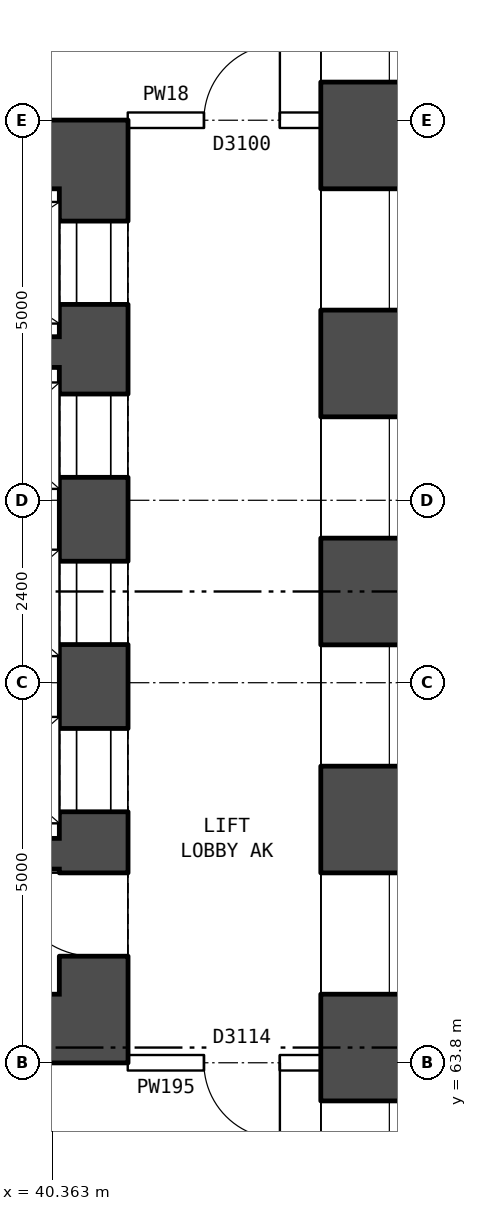
"""IFC4 building model, lengths in metres.
Left out: names, types, materials, properties, quantities, classifications, styles, units other than length and angle.
Written with IfcOpenShell. Run it as: python <this file> out.ifc"""

import sys

from ifc_helpers import new_model, si_unit, direction, frame, frame_2d, origin, place, context, subcontext, project, spatial, rectangle, extrude, element, fill, save


model = new_model("IFC4")
c1 = context("Model", 3, precision=1e-05, world=origin(), true_north=direction((0.0, 1.0)))
c2 = subcontext(c1, "Body", "Model", "MODEL_VIEW")
j1 = project(units=[si_unit("LENGTHUNIT", "METRE"), si_unit("PLANEANGLEUNIT", "RADIAN")], contexts=[c1])
p1 = place(None, origin())
s1 = spatial("IfcSite", under=j1, at=p1, CompositionType="ELEMENT")
p2 = place(p1, origin())
s2 = spatial("IfcBuilding", under=s1, at=p2, CompositionType="ELEMENT")
p3 = place(p2, frame((0.0, 0.0, 5.5)))
s3 = spatial("IfcBuildingStorey", under=s2, at=p3, CompositionType="ELEMENT", Elevation=5.5)
p4 = place(p3, frame((44.5, 56.4, -0.3), z_axis=(0.0, 0.0, 1.0), x_axis=(0.0, 1.0, 0.0)))
e1 = element("IfcWall", 1, at=p4, inside=s3, PredefinedType="SHEAR", context=c2, shape_type="SweptSolid", body=[
    extrude(rectangle(XDim=27.2, YDim=1.2, at=frame_2d((13.6, 0.0))), origin(), (0.0, 0.0, 1.0), 4.6),
])
p5 = place(p4, frame((2.3, 0.0, 0.8)))
e2 = element("IfcOpeningElement", 2, at=p5, cuts=e1, PredefinedType="OPENING", context=c2, shape_type="SweptSolid", body=[
    extrude(rectangle(XDim=1.6, YDim=1.8, at=frame_2d((0.8, 0.9))), frame((0.0, 0.61, 0.0), z_axis=(0.0, -1.0, 0.0), x_axis=(1.0, 0.0, 0.0)), (0.0, 0.0, 1.0), 1.22),
])
p6 = place(p4, frame((5.3, 0.0, 0.8)))
e3 = element("IfcOpeningElement", 3, at=p6, cuts=e1, PredefinedType="OPENING", context=c2, shape_type="SweptSolid", body=[
    extrude(rectangle(XDim=1.6, YDim=1.8, at=frame_2d((0.8, 0.9))), frame((0.0, 0.61, 0.0), z_axis=(0.0, -1.0, 0.0), x_axis=(1.0, 0.0, 0.0)), (0.0, 0.0, 1.0), 1.22),
])
p7 = place(p4, frame((8.3, 0.0, 0.8)))
e4 = element("IfcOpeningElement", 4, at=p7, cuts=e1, PredefinedType="OPENING", context=c2, shape_type="SweptSolid", body=[
    extrude(rectangle(XDim=1.6, YDim=1.8, at=frame_2d((0.8, 0.9))), frame((0.0, 0.61, 0.0), z_axis=(0.0, -1.0, 0.0), x_axis=(1.0, 0.0, 0.0)), (0.0, 0.0, 1.0), 1.22),
])
p8 = place(p4, frame((11.3, 0.0, 0.8)))
e5 = element("IfcOpeningElement", 5, at=p8, cuts=e1, PredefinedType="OPENING", context=c2, shape_type="SweptSolid", body=[
    extrude(rectangle(XDim=1.6, YDim=1.8, at=frame_2d((0.8, 0.9))), frame((0.0, 0.61, 0.0), z_axis=(0.0, -1.0, 0.0), x_axis=(1.0, 0.0, 0.0)), (0.0, 0.0, 1.0), 1.22),
])
p9 = place(p4, frame((14.3, 0.0, 0.8)))
e6 = element("IfcOpeningElement", 6, at=p9, cuts=e1, PredefinedType="OPENING", context=c2, shape_type="SweptSolid", body=[
    extrude(rectangle(XDim=1.6, YDim=1.8, at=frame_2d((0.8, 0.9))), frame((0.0, 0.61, 0.0), z_axis=(0.0, -1.0, 0.0), x_axis=(1.0, 0.0, 0.0)), (0.0, 0.0, 1.0), 1.22),
])
p10 = place(p4, frame((17.3, 0.0, 0.8)))
e7 = element("IfcOpeningElement", 7, at=p10, cuts=e1, PredefinedType="OPENING", context=c2, shape_type="SweptSolid", body=[
    extrude(rectangle(XDim=1.6, YDim=1.8, at=frame_2d((0.8, 0.9))), frame((0.0, 0.61, 0.0), z_axis=(0.0, -1.0, 0.0), x_axis=(1.0, 0.0, 0.0)), (0.0, 0.0, 1.0), 1.22),
])
p11 = place(p4, frame((20.3, 0.0, 0.8)))
e8 = element("IfcOpeningElement", 8, at=p11, cuts=e1, PredefinedType="OPENING", context=c2, shape_type="SweptSolid", body=[
    extrude(rectangle(XDim=1.6, YDim=1.8, at=frame_2d((0.8, 0.9))), frame((0.0, 0.61, 0.0), z_axis=(0.0, -1.0, 0.0), x_axis=(1.0, 0.0, 0.0)), (0.0, 0.0, 1.0), 1.22),
])
p12 = place(p4, frame((23.3, 0.0, 0.8)))
e9 = element("IfcOpeningElement", 9, at=p12, cuts=e1, PredefinedType="OPENING", context=c2, shape_type="SweptSolid", body=[
    extrude(rectangle(XDim=1.6, YDim=1.8, at=frame_2d((0.8, 0.9))), frame((0.0, 0.61, 0.0), z_axis=(0.0, -1.0, 0.0), x_axis=(1.0, 0.0, 0.0)), (0.0, 0.0, 1.0), 1.22),
])
p13 = place(p3, frame((40.91, 75.3, 0.0), z_axis=(0.0, 0.0, 1.0), x_axis=(0.0, -1.0, 0.0)))
e10 = element("IfcWall", 10, at=p13, inside=s3, PredefinedType="SHEAR", context=c2, shape_type="SweptSolid", body=[
    extrude(rectangle(XDim=10.6, YDim=0.9, at=frame_2d((5.3, 0.0))), origin(), (0.0, 0.0, 1.0), 4.3),
])
p14 = place(p13, frame((0.425, 0.0, 0.0)))
e11 = element("IfcOpeningElement", 11, at=p14, cuts=e10, PredefinedType="OPENING", context=c2, shape_type="SweptSolid", body=[
    extrude(rectangle(XDim=1.1, YDim=2.1, at=frame_2d((0.55, 1.05))), frame((0.0, 0.46, 0.0), z_axis=(0.0, -1.0, 0.0), x_axis=(1.0, 0.0, 0.0)), (0.0, 0.0, 1.0), 0.92),
])
p15 = place(p13, frame((2.7, 0.0, 0.0)))
e12 = element("IfcOpeningElement", 12, at=p15, cuts=e10, PredefinedType="OPENING", context=c2, shape_type="SweptSolid", body=[
    extrude(rectangle(XDim=1.1, YDim=2.1, at=frame_2d((0.55, 1.05))), frame((0.0, 0.46, 0.0), z_axis=(0.0, -1.0, 0.0), x_axis=(1.0, 0.0, 0.0)), (0.0, 0.0, 1.0), 0.92),
])
p16 = place(p13, frame((4.9, 0.0, 0.0)))
e13 = element("IfcOpeningElement", 13, at=p16, cuts=e10, PredefinedType="OPENING", context=c2, shape_type="SweptSolid", body=[
    extrude(rectangle(XDim=1.1, YDim=2.1, at=frame_2d((0.55, 1.05))), frame((0.0, 0.46, 0.0), z_axis=(0.0, -1.0, 0.0), x_axis=(1.0, 0.0, 0.0)), (0.0, 0.0, 1.0), 0.92),
])
p17 = place(p13, frame((7.1, 0.0, 0.0)))
e14 = element("IfcOpeningElement", 14, at=p17, cuts=e10, PredefinedType="OPENING", context=c2, shape_type="SweptSolid", body=[
    extrude(rectangle(XDim=1.1, YDim=2.1, at=frame_2d((0.55, 1.05))), frame((0.0, 0.46, 0.0), z_axis=(0.0, -1.0, 0.0), x_axis=(1.0, 0.0, 0.0)), (0.0, 0.0, 1.0), 0.92),
])
p18 = place(p13, frame((9.0, 0.0, 0.0)))
e15 = element("IfcOpeningElement", 15, at=p18, cuts=e10, PredefinedType="OPENING", context=c2, shape_type="SweptSolid", body=[
    extrude(rectangle(XDim=1.1, YDim=2.1, at=frame_2d((0.55, 1.05))), frame((0.0, 0.46, 0.0), z_axis=(0.0, -1.0, 0.0), x_axis=(1.0, 0.0, 0.0)), (0.0, 0.0, 1.0), 0.92),
])
for number, where, z_axis, x_axis in (
    (16, (41.36, 75.75, 0.0), (0.0, 0.0, 1.0), (-1.0, 0.0, 0.0)),
    (17, (41.36, 64.25, 0.0), (0.0, 0.0, 1.0), (-1.0, 0.0, 0.0)),
):
    element("IfcWall", number, at=place(p3, frame(where, z_axis=z_axis, x_axis=x_axis)), inside=s3, PredefinedType="SHEAR", context=c2, shape_type="SweptSolid", body=[
        extrude(rectangle(XDim=9.0, YDim=0.9, at=frame_2d((4.5, 0.0))), origin(), (0.0, 0.0, 1.0), 4.3),
    ])
p19 = place(p3, frame((40.46, 73.15, 0.0), z_axis=(0.0, 0.0, 1.0), x_axis=(-1.0, 0.0, 0.0)))
e18 = element("IfcWall", 18, at=p19, inside=s3, PredefinedType="SHEAR", context=c2, shape_type="SweptSolid", body=[
    extrude(rectangle(XDim=3.17, YDim=0.4, at=frame_2d((1.585, 0.0))), origin(), (0.0, 0.0, 1.0), 4.3),
])
p20 = place(p3, frame((40.46, 66.55, 0.0), z_axis=(0.0, 0.0, 1.0), x_axis=(-1.0, 0.0, 0.0)))
e19 = element("IfcWall", 19, at=p20, inside=s3, PredefinedType="SHEAR", context=c2, shape_type="SweptSolid", body=[
    extrude(rectangle(XDim=1.95, YDim=0.4, at=frame_2d((0.975, 0.0))), origin(), (0.0, 0.0, 1.0), 4.3),
])
p21 = place(p3, frame((41.36, 63.8, 0.0), z_axis=(0.0, 0.0, 1.0), x_axis=(1.0, 0.0, 0.0)))
e20 = element("IfcWall", 20, at=p21, inside=s3, PredefinedType="PARTITIONING", context=c2, shape_type="SweptSolid", body=[
    extrude(rectangle(XDim=2.54, YDim=0.2, at=frame_2d((1.27, 0.0))), origin(), (0.0, 0.0, 1.0), 4.3),
])
p22 = place(p21, frame((1.0, 0.0, 0.0)))
e21 = element("IfcOpeningElement", 21, at=p22, cuts=e20, PredefinedType="OPENING", context=c2, shape_type="SweptSolid", body=[
    extrude(rectangle(XDim=1.0, YDim=2.1, at=frame_2d((0.5, 1.05))), frame((0.0, 0.11, 0.0), z_axis=(0.0, -1.0, 0.0), x_axis=(1.0, 0.0, 0.0)), (0.0, 0.0, 1.0), 0.22),
])
p23 = place(p3, frame((41.36, 76.2, 0.0), z_axis=(0.0, 0.0, 1.0), x_axis=(1.0, 0.0, 0.0)))
e22 = element("IfcWall", 22, at=p23, inside=s3, PredefinedType="PARTITIONING", context=c2, shape_type="SweptSolid", body=[
    extrude(rectangle(XDim=2.54, YDim=0.2, at=frame_2d((1.27, 0.0))), origin(), (0.0, 0.0, 1.0), 4.3),
])
p24 = place(p23, frame((1.0, 0.0, 0.0)))
e23 = element("IfcOpeningElement", 23, at=p24, cuts=e22, PredefinedType="OPENING", context=c2, shape_type="SweptSolid", body=[
    extrude(rectangle(XDim=1.0, YDim=2.1, at=frame_2d((0.5, 1.05))), frame((0.0, 0.11, 0.0), z_axis=(0.0, -1.0, 0.0), x_axis=(1.0, 0.0, 0.0)), (0.0, 0.0, 1.0), 0.22),
])
p25 = place(p6, origin())
e24 = element("IfcWindow", 24, at=p25, inside=s3, PartitioningType="SINGLE_PANEL", PredefinedType="WINDOW", context=c2, shape_type="SweptSolid", body=[
    extrude(rectangle(XDim=1.6, YDim=1.8, at=frame_2d((0.8, 0.9))), frame((0.0, -0.27, 0.0), z_axis=(0.0, -1.0, 0.0), x_axis=(1.0, 0.0, 0.0)), (0.0, 0.0, 1.0), 0.06),
])
fill(e3, e24)
p26 = place(p7, origin())
e25 = element("IfcWindow", 25, at=p26, inside=s3, PartitioningType="SINGLE_PANEL", PredefinedType="WINDOW", context=c2, shape_type="SweptSolid", body=[
    extrude(rectangle(XDim=1.6, YDim=1.8, at=frame_2d((0.8, 0.9))), frame((0.0, -0.27, 0.0), z_axis=(0.0, -1.0, 0.0), x_axis=(1.0, 0.0, 0.0)), (0.0, 0.0, 1.0), 0.06),
])
fill(e4, e25)
p27 = place(p8, origin())
e26 = element("IfcWindow", 26, at=p27, inside=s3, PartitioningType="SINGLE_PANEL", PredefinedType="WINDOW", context=c2, shape_type="SweptSolid", body=[
    extrude(rectangle(XDim=1.6, YDim=1.8, at=frame_2d((0.8, 0.9))), frame((0.0, -0.27, 0.0), z_axis=(0.0, -1.0, 0.0), x_axis=(1.0, 0.0, 0.0)), (0.0, 0.0, 1.0), 0.06),
])
fill(e5, e26)
p28 = place(p9, origin())
e27 = element("IfcWindow", 27, at=p28, inside=s3, PartitioningType="SINGLE_PANEL", PredefinedType="WINDOW", context=c2, shape_type="SweptSolid", body=[
    extrude(rectangle(XDim=1.6, YDim=1.8, at=frame_2d((0.8, 0.9))), frame((0.0, -0.27, 0.0), z_axis=(0.0, -1.0, 0.0), x_axis=(1.0, 0.0, 0.0)), (0.0, 0.0, 1.0), 0.06),
])
fill(e6, e27)
p29 = place(p10, origin())
e28 = element("IfcWindow", 28, at=p29, inside=s3, PartitioningType="SINGLE_PANEL", PredefinedType="WINDOW", context=c2, shape_type="SweptSolid", body=[
    extrude(rectangle(XDim=1.6, YDim=1.8, at=frame_2d((0.8, 0.9))), frame((0.0, -0.27, 0.0), z_axis=(0.0, -1.0, 0.0), x_axis=(1.0, 0.0, 0.0)), (0.0, 0.0, 1.0), 0.06),
])
fill(e7, e28)
p30 = place(p11, origin())
e29 = element("IfcWindow", 29, at=p30, inside=s3, PartitioningType="SINGLE_PANEL", PredefinedType="WINDOW", context=c2, shape_type="SweptSolid", body=[
    extrude(rectangle(XDim=1.6, YDim=1.8, at=frame_2d((0.8, 0.9))), frame((0.0, -0.27, 0.0), z_axis=(0.0, -1.0, 0.0), x_axis=(1.0, 0.0, 0.0)), (0.0, 0.0, 1.0), 0.06),
])
fill(e8, e29)
p31 = place(p14, origin())
e30 = element("IfcDoor", 30, at=p31, inside=s3, OperationType="DOUBLE_DOOR_SLIDING", PredefinedType="DOOR", context=c2, shape_type="SweptSolid", body=[
    extrude(rectangle(XDim=1.1, YDim=2.1, at=frame_2d((0.55, 1.05))), frame((0.0, -0.385, 0.0), z_axis=(0.0, -1.0, 0.0), x_axis=(1.0, 0.0, 0.0)), (0.0, 0.0, 1.0), 0.05),
])
fill(e11, e30)
p32 = place(p15, origin())
e31 = element("IfcDoor", 31, at=p32, inside=s3, OperationType="DOUBLE_DOOR_SLIDING", PredefinedType="DOOR", context=c2, shape_type="SweptSolid", body=[
    extrude(rectangle(XDim=1.1, YDim=2.1, at=frame_2d((0.55, 1.05))), frame((0.0, -0.385, 0.0), z_axis=(0.0, -1.0, 0.0), x_axis=(1.0, 0.0, 0.0)), (0.0, 0.0, 1.0), 0.05),
])
fill(e12, e31)
p33 = place(p16, origin())
e32 = element("IfcDoor", 32, at=p33, inside=s3, OperationType="DOUBLE_DOOR_SLIDING", PredefinedType="DOOR", context=c2, shape_type="SweptSolid", body=[
    extrude(rectangle(XDim=1.1, YDim=2.1, at=frame_2d((0.55, 1.05))), frame((0.0, -0.385, 0.0), z_axis=(0.0, -1.0, 0.0), x_axis=(1.0, 0.0, 0.0)), (0.0, 0.0, 1.0), 0.05),
])
fill(e13, e32)
p34 = place(p17, origin())
e33 = element("IfcDoor", 33, at=p34, inside=s3, OperationType="DOUBLE_DOOR_SLIDING", PredefinedType="DOOR", context=c2, shape_type="SweptSolid", body=[
    extrude(rectangle(XDim=1.1, YDim=2.1, at=frame_2d((0.55, 1.05))), frame((0.0, -0.385, 0.0), z_axis=(0.0, -1.0, 0.0), x_axis=(1.0, 0.0, 0.0)), (0.0, 0.0, 1.0), 0.05),
])
fill(e14, e33)
p35 = place(p18, frame((1.1, 0.0, 0.0), z_axis=(0.0, 0.0, 1.0), x_axis=(-1.0, 0.0, 0.0)))
e34 = element("IfcDoor", 34, at=p35, inside=s3, OperationType="SINGLE_SWING_RIGHT", PredefinedType="DOOR", context=c2, shape_type="SweptSolid", body=[
    extrude(rectangle(XDim=1.1, YDim=2.1, at=frame_2d((0.55, 1.05))), frame((0.0, 0.435, 0.0), z_axis=(0.0, -1.0, 0.0), x_axis=(1.0, 0.0, 0.0)), (0.0, 0.0, 1.0), 0.05),
])
fill(e15, e34)
p36 = place(p22, frame((1.0, 0.0, 0.0), z_axis=(0.0, 0.0, 1.0), x_axis=(-1.0, 0.0, 0.0)))
e35 = element("IfcDoor", 35, at=p36, inside=s3, OperationType="SINGLE_SWING_LEFT", PredefinedType="DOOR", context=c2, shape_type="SweptSolid", body=[
    extrude(rectangle(XDim=1.0, YDim=2.1, at=frame_2d((0.5, 1.05))), frame((0.0, 0.025, 0.0), z_axis=(0.0, -1.0, 0.0), x_axis=(1.0, 0.0, 0.0)), (0.0, 0.0, 1.0), 0.05),
])
fill(e21, e35)
p37 = place(p24, origin())
e36 = element("IfcDoor", 36, at=p37, inside=s3, OperationType="SINGLE_SWING_RIGHT", PredefinedType="DOOR", context=c2, shape_type="SweptSolid", body=[
    extrude(rectangle(XDim=1.0, YDim=2.1, at=frame_2d((0.5, 1.05))), frame((0.0, 0.025, 0.0), z_axis=(0.0, -1.0, 0.0), x_axis=(1.0, 0.0, 0.0)), (0.0, 0.0, 1.0), 0.05),
])
fill(e23, e36)
save(model, sys.argv[1])
